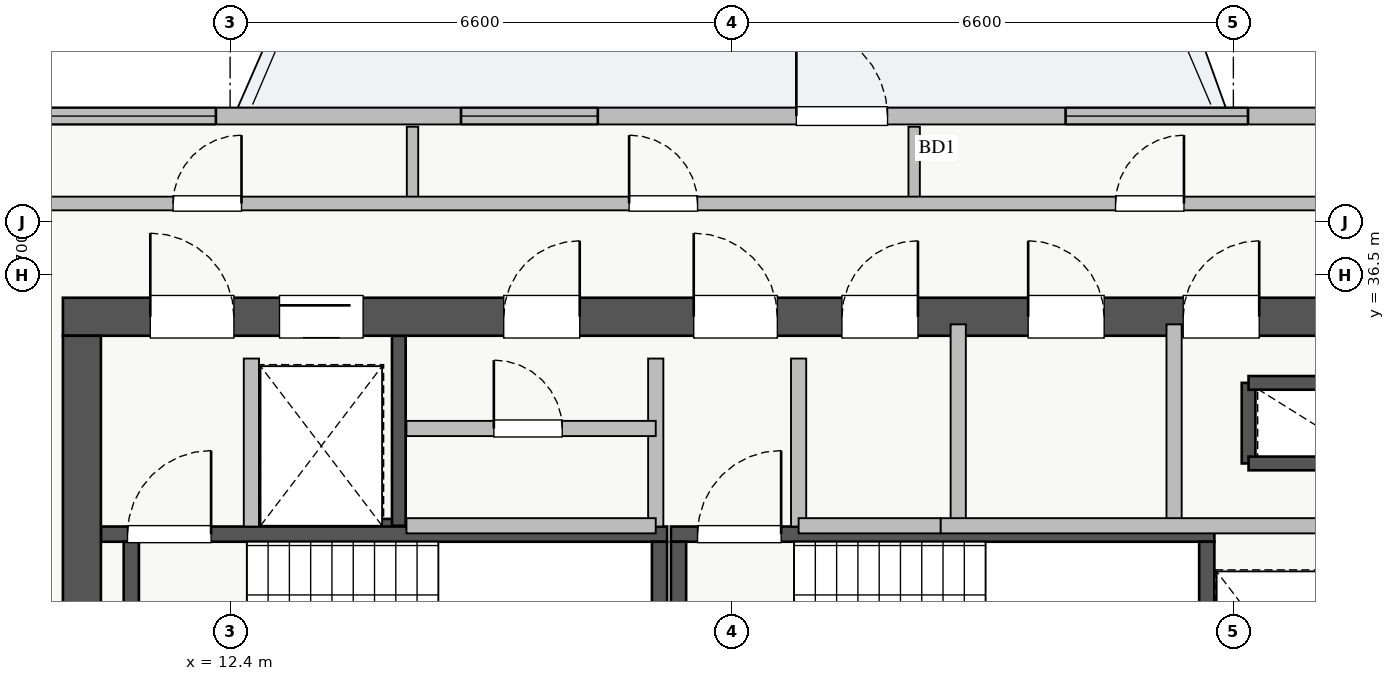
"""IFC4 building model, lengths in metres.
Left out: names, types, materials, properties, quantities, classifications, styles, units other than length and angle.
Written with IfcOpenShell. Run it as: python <this file> out.ifc"""

import sys

from ifc_helpers import new_model, si_unit, direction, frame, frame_2d, origin, place, context, subcontext, project, spatial, rectangle, extrude, source, transform, mapped, element, fill, save


model = new_model("IFC4")
c1 = context("Model", 3, precision=1e-05, world=origin(), true_north=direction((0.0, 1.0)))
c2 = subcontext(c1, "Body", "Model", "MODEL_VIEW")
j1 = project(units=[si_unit("LENGTHUNIT", "METRE"), si_unit("PLANEANGLEUNIT", "RADIAN")], contexts=[c1])
p1 = place(None, origin())
s1 = spatial("IfcSite", under=j1, at=p1, CompositionType="ELEMENT")
p2 = place(p1, origin())
s2 = spatial("IfcBuilding", under=s1, at=p2, CompositionType="ELEMENT")
p3 = place(p2, frame((0.0, 0.0, 260.0)))
s3 = spatial("IfcBuildingStorey", under=s2, at=p3, CompositionType="ELEMENT", Elevation=260.0)
p4 = place(p3, frame((12.68, 33.2, 0.0), z_axis=(0.0, 0.0, 1.0), x_axis=(1.0, 0.0, 0.0)))
e1 = element("IfcWall", 1, at=p4, inside=s3, PredefinedType="SHEAR", context=c2, shape_type="SweptSolid", body=[
    extrude(rectangle(XDim=1.94, YDim=0.18, at=frame_2d((0.97, 0.0))), origin(), (0.0, 0.0, 1.0), 3.03),
])
p5 = place(p3, frame((14.62, 33.2, 0.0), z_axis=(0.0, 0.0, 1.0), x_axis=(0.0, 1.0, 0.0)))
e2 = element("IfcWall", 2, at=p5, inside=s3, PredefinedType="SHEAR", context=c2, shape_type="SweptSolid", body=[
    extrude(rectangle(XDim=2.5, YDim=0.18, at=frame_2d((1.25, 0.0))), origin(), (0.0, 0.0, 1.0), 3.03),
])
p6 = place(p3, frame((25.8, 34.02, 0.0), z_axis=(0.0, 0.0, 1.0), x_axis=(0.0, 1.0, 0.0)))
e3 = element("IfcWall", 3, at=p6, inside=s3, PredefinedType="SHEAR", context=c2, shape_type="SweptSolid", body=[
    extrude(rectangle(XDim=1.06, YDim=0.18, at=frame_2d((0.53, 0.0))), origin(), (0.0, 0.0, 1.0), 3.03),
])
for number, where, z_axis, x_axis in (
    (4, (25.8, 35.08, 0.0), (0.0, 0.0, 1.0), (1.0, 0.0, 0.0)),
    (5, (25.8, 34.02, 0.0), (0.0, 0.0, 1.0), (1.0, 0.0, 0.0)),
):
    element("IfcWall", number, at=place(p3, frame(where, z_axis=z_axis, x_axis=x_axis)), inside=s3, PredefinedType="SHEAR", context=c2, shape_type="SweptSolid", body=[
        extrude(rectangle(XDim=1.5, YDim=0.18, at=frame_2d((0.75, 0.0))), origin(), (0.0, 0.0, 1.0), 3.03),
    ])
p7 = place(p3, frame((10.7, 33.09, 0.0), z_axis=(0.0, 0.0, 1.0), x_axis=(1.0, 0.0, 0.0)))
e6 = element("IfcWall", 6, at=p7, inside=s3, PredefinedType="SHEAR", context=c2, shape_type="SweptSolid", body=[
    extrude(rectangle(XDim=7.45, YDim=0.2, at=frame_2d((3.725, 0.0))), origin(), (0.0, 0.0, 1.0), 3.25),
])
p8 = place(p7, frame((0.35, 0.0, 0.0)))
e7 = element("IfcOpeningElement", 7, at=p8, cuts=e6, PredefinedType="OPENING", context=c2, shape_type="SweptSolid", body=[
    extrude(rectangle(XDim=1.1, YDim=2.05, at=frame_2d((0.55, 1.025))), frame((0.0, 0.11, 0.0), z_axis=(0.0, -1.0, 0.0), x_axis=(1.0, 0.0, 0.0)), (0.0, 0.0, 1.0), 0.22),
])
for number, where, z_axis, x_axis in (
    (8, (11.1, 30.05, 0.0), (0.0, 0.0, 1.0), (0.0, 1.0, 0.0)),
    (9, (18.05, 30.05, 0.0), (0.0, 0.0, 1.0), (0.0, 1.0, 0.0)),
):
    element("IfcWall", number, at=place(p3, frame(where, z_axis=z_axis, x_axis=x_axis)), inside=s3, PredefinedType="SHEAR", context=c2, shape_type="SweptSolid", body=[
        extrude(rectangle(XDim=2.94, YDim=0.2, at=frame_2d((1.47, 0.0))), origin(), (0.0, 0.0, 1.0), 3.25),
    ])
p9 = place(p3, frame((18.2, 33.09, 0.0), z_axis=(0.0, 0.0, 1.0), x_axis=(1.0, 0.0, 0.0)))
e10 = element("IfcWall", 10, at=p9, inside=s3, PredefinedType="SHEAR", context=c2, shape_type="SweptSolid", body=[
    extrude(rectangle(XDim=7.15, YDim=0.2, at=frame_2d((3.575, 0.0))), origin(), (0.0, 0.0, 1.0), 3.25),
])
p10 = place(p9, frame((0.35, 0.0, 0.0)))
e11 = element("IfcOpeningElement", 11, at=p10, cuts=e10, PredefinedType="OPENING", context=c2, shape_type="SweptSolid", body=[
    extrude(rectangle(XDim=1.1, YDim=2.05, at=frame_2d((0.55, 1.025))), frame((0.0, 0.11, 0.0), z_axis=(0.0, -1.0, 0.0), x_axis=(1.0, 0.0, 0.0)), (0.0, 0.0, 1.0), 0.22),
])
for number, where, z_axis, x_axis in (
    (12, (18.3, 30.05, 0.0), (0.0, 0.0, 1.0), (0.0, 1.0, 0.0)),
    (13, (25.25, 30.05, 0.0), (0.0, 0.0, 1.0), (0.0, 1.0, 0.0)),
):
    element("IfcWall", number, at=place(p3, frame(where, z_axis=z_axis, x_axis=x_axis)), inside=s3, PredefinedType="SHEAR", context=c2, shape_type="SweptSolid", body=[
        extrude(rectangle(XDim=2.94, YDim=0.2, at=frame_2d((1.47, 0.0))), origin(), (0.0, 0.0, 1.0), 3.25),
    ])
p11 = place(p3, frame((10.2, 35.95, 0.0), z_axis=(0.0, 0.0, 1.0), x_axis=(1.0, 0.0, 0.0)))
e14 = element("IfcWall", 14, at=p11, inside=s3, PredefinedType="SHEAR", context=c2, shape_type="SweptSolid", body=[
    extrude(rectangle(XDim=17.6, YDim=0.5, at=frame_2d((8.8, 0.0))), origin(), (0.0, 0.0, 1.0), 3.25),
])
p12 = place(p11, frame((1.15, 0.0, 0.0)))
e15 = element("IfcOpeningElement", 15, at=p12, cuts=e14, PredefinedType="OPENING", context=c2, shape_type="SweptSolid", body=[
    extrude(rectangle(XDim=1.1, YDim=2.05, at=frame_2d((0.55, 1.025))), frame((0.0, 0.26, 0.0), z_axis=(0.0, -1.0, 0.0), x_axis=(1.0, 0.0, 0.0)), (0.0, 0.0, 1.0), 0.52),
])
p13 = place(p11, frame((8.3, 0.0, 0.0)))
e16 = element("IfcOpeningElement", 16, at=p13, cuts=e14, PredefinedType="OPENING", context=c2, shape_type="SweptSolid", body=[
    extrude(rectangle(XDim=1.1, YDim=2.05, at=frame_2d((0.55, 1.025))), frame((0.0, 0.26, 0.0), z_axis=(0.0, -1.0, 0.0), x_axis=(1.0, 0.0, 0.0)), (0.0, 0.0, 1.0), 0.52),
])
p14 = place(p11, frame((2.85, 0.0, 0.0)))
e17 = element("IfcOpeningElement", 17, at=p14, cuts=e14, PredefinedType="OPENING", context=c2, shape_type="SweptSolid", body=[
    extrude(rectangle(XDim=1.1, YDim=2.05, at=frame_2d((0.55, 1.025))), frame((0.0, 0.26, 0.0), z_axis=(0.0, -1.0, 0.0), x_axis=(1.0, 0.0, 0.0)), (0.0, 0.0, 1.0), 0.52),
])
p15 = place(p11, frame((5.8, 0.0, 0.0)))
e18 = element("IfcOpeningElement", 18, at=p15, cuts=e14, PredefinedType="OPENING", context=c2, shape_type="SweptSolid", body=[
    extrude(rectangle(XDim=1.0, YDim=2.05, at=frame_2d((0.5, 1.025))), frame((0.0, 0.26, 0.0), z_axis=(0.0, -1.0, 0.0), x_axis=(1.0, 0.0, 0.0)), (0.0, 0.0, 1.0), 0.52),
])
p16 = place(p11, frame((14.74, 0.0, 0.0)))
e19 = element("IfcOpeningElement", 19, at=p16, cuts=e14, PredefinedType="OPENING", context=c2, shape_type="SweptSolid", body=[
    extrude(rectangle(XDim=1.0, YDim=2.05, at=frame_2d((0.5, 1.025))), frame((0.0, 0.26, 0.0), z_axis=(0.0, -1.0, 0.0), x_axis=(1.0, 0.0, 0.0)), (0.0, 0.0, 1.0), 0.52),
])
p17 = place(p11, frame((10.25, 0.0, 0.0)))
e20 = element("IfcOpeningElement", 20, at=p17, cuts=e14, PredefinedType="OPENING", context=c2, shape_type="SweptSolid", body=[
    extrude(rectangle(XDim=1.0, YDim=2.05, at=frame_2d((0.5, 1.025))), frame((0.0, 0.26, 0.0), z_axis=(0.0, -1.0, 0.0), x_axis=(1.0, 0.0, 0.0)), (0.0, 0.0, 1.0), 0.52),
])
p18 = place(p11, frame((12.7, 0.0, 0.0)))
e21 = element("IfcOpeningElement", 21, at=p18, cuts=e14, PredefinedType="OPENING", context=c2, shape_type="SweptSolid", body=[
    extrude(rectangle(XDim=1.0, YDim=2.05, at=frame_2d((0.5, 1.025))), frame((0.0, 0.26, 0.0), z_axis=(0.0, -1.0, 0.0), x_axis=(1.0, 0.0, 0.0)), (0.0, 0.0, 1.0), 0.52),
])
p19 = place(p3, frame((10.45, 29.5, 0.0), z_axis=(0.0, 0.0, 1.0), x_axis=(0.0, 1.0, 0.0)))
e22 = element("IfcWall", 22, at=p19, inside=s3, PredefinedType="SHEAR", context=c2, shape_type="SweptSolid", body=[
    extrude(rectangle(XDim=6.2, YDim=0.5, at=frame_2d((3.1, 0.0))), origin(), (0.0, 0.0, 1.0), 3.25),
])
p20 = place(p3, frame((8.35, 38.59, 0.0), z_axis=(0.0, 0.0, 1.0), x_axis=(1.0, 0.0, 0.0)))
e23 = element("IfcWall", 23, at=p20, inside=s3, PredefinedType="STANDARD", context=c2, shape_type="SweptSolid", body=[
    extrude(rectangle(XDim=21.3, YDim=0.22, at=frame_2d((10.65, 0.0))), origin(), (0.0, 0.0, 1.0), 2.57),
])
p21 = place(p20, frame((11.5, 0.0, 0.0)))
e24 = element("IfcOpeningElement", 24, at=p21, cuts=e23, PredefinedType="OPENING", context=c2, shape_type="SweptSolid", body=[
    extrude(rectangle(XDim=1.2, YDim=2.1, at=frame_2d((0.6, 1.05))), frame((0.0, 0.12, 0.0), z_axis=(0.0, -1.0, 0.0), x_axis=(1.0, 0.0, 0.0)), (0.0, 0.0, 1.0), 0.24),
])
p22 = place(p20, frame((1.463, 0.0, 0.9)))
e25 = element("IfcOpeningElement", 25, at=p22, cuts=e23, PredefinedType="OPENING", context=c2, shape_type="SweptSolid", body=[
    extrude(rectangle(XDim=2.4, YDim=1.48, at=frame_2d((1.2, 0.74))), frame((0.0, 0.12, 0.0), z_axis=(0.0, -1.0, 0.0), x_axis=(1.0, 0.0, 0.0)), (0.0, 0.0, 1.0), 0.24),
])
p23 = place(p20, frame((7.088, 0.0, 0.9)))
e26 = element("IfcOpeningElement", 26, at=p23, cuts=e23, PredefinedType="OPENING", context=c2, shape_type="SweptSolid", body=[
    extrude(rectangle(XDim=1.8, YDim=1.45, at=frame_2d((0.9, 0.725))), frame((0.0, 0.12, 0.0), z_axis=(0.0, -1.0, 0.0), x_axis=(1.0, 0.0, 0.0)), (0.0, 0.0, 1.0), 0.24),
])
p24 = place(p20, frame((19.775, 0.0, 0.9)))
e27 = element("IfcOpeningElement", 27, at=p24, cuts=e23, PredefinedType="OPENING", context=c2, shape_type="SweptSolid", body=[
    extrude(rectangle(XDim=1.2, YDim=1.4, at=frame_2d((0.6, 0.7))), frame((0.0, 0.12, 0.0), z_axis=(0.0, -1.0, 0.0), x_axis=(1.0, 0.0, 0.0)), (0.0, 0.0, 1.0), 0.24),
])
p25 = place(p20, frame((15.042, 0.0, 0.9)))
e28 = element("IfcOpeningElement", 28, at=p25, cuts=e23, PredefinedType="OPENING", context=c2, shape_type="SweptSolid", body=[
    extrude(rectangle(XDim=2.4, YDim=1.5, at=frame_2d((1.2, 0.75))), frame((0.0, 0.12, 0.0), z_axis=(0.0, -1.0, 0.0), x_axis=(1.0, 0.0, 0.0)), (0.0, 0.0, 1.0), 0.24),
])
for number, where, z_axis, x_axis in (
    (29, (12.68, 33.19, 0.0), (0.0, 0.0, 1.0), (0.0, 1.0, 0.0)),
    (30, (18.0, 33.19, 0.0), (0.0, 0.0, 1.0), (0.0, 1.0, 0.0)),
    (31, (19.88, 33.19, 0.0), (0.0, 0.0, 1.0), (0.0, 1.0, 0.0)),
):
    element("IfcWall", number, at=place(p3, frame(where, z_axis=z_axis, x_axis=x_axis)), inside=s3, PredefinedType="PARTITIONING", context=c2, shape_type="SweptSolid", body=[
        extrude(rectangle(XDim=2.21, YDim=0.2, at=frame_2d((1.105, 0.0))), origin(), (0.0, 0.0, 1.0), 3.03),
    ])
p26 = place(p3, frame((14.72, 34.48, 0.0), z_axis=(0.0, 0.0, 1.0), x_axis=(1.0, 0.0, 0.0)))
e32 = element("IfcWall", 32, at=p26, inside=s3, PredefinedType="PARTITIONING", context=c2, shape_type="SweptSolid", body=[
    extrude(rectangle(XDim=3.28, YDim=0.2, at=frame_2d((1.64, 0.0))), origin(), (0.0, 0.0, 1.0), 3.03),
])
p27 = place(p26, frame((1.15, 0.0, 0.0)))
e33 = element("IfcOpeningElement", 33, at=p27, cuts=e32, PredefinedType="OPENING", context=c2, shape_type="SweptSolid", body=[
    extrude(rectangle(XDim=0.9, YDim=2.05, at=frame_2d((0.45, 1.025))), frame((0.0, 0.11, 0.0), z_axis=(0.0, -1.0, 0.0), x_axis=(1.0, 0.0, 0.0)), (0.0, 0.0, 1.0), 0.22),
])
p28 = place(p3, frame((14.72, 33.2, 0.0), z_axis=(0.0, 0.0, 1.0), x_axis=(1.0, 0.0, 0.0)))
e34 = element("IfcWall", 34, at=p28, inside=s3, PredefinedType="PARTITIONING", context=c2, shape_type="SweptSolid", body=[
    extrude(rectangle(XDim=3.28, YDim=0.2, at=frame_2d((1.64, 0.0))), origin(), (0.0, 0.0, 1.0), 3.03),
])
p29 = place(p3, frame((24.82, 33.2, 0.0), z_axis=(0.0, 0.0, 1.0), x_axis=(0.0, 1.0, 0.0)))
e35 = element("IfcWall", 35, at=p29, inside=s3, PredefinedType="PARTITIONING", context=c2, shape_type="SweptSolid", body=[
    extrude(rectangle(XDim=2.65, YDim=0.2, at=frame_2d((1.325, 0.0))), origin(), (0.0, 0.0, 1.0), 3.03),
])
p30 = place(p3, frame((19.88, 33.2, 0.0), z_axis=(0.0, 0.0, 1.0), x_axis=(1.0, 0.0, 0.0)))
e36 = element("IfcWall", 36, at=p30, inside=s3, PredefinedType="PARTITIONING", context=c2, shape_type="SweptSolid", body=[
    extrude(rectangle(XDim=1.87, YDim=0.2, at=frame_2d((0.935, 0.0))), origin(), (0.0, 0.0, 1.0), 3.03),
])
p31 = place(p3, frame((21.98, 33.2, 0.0), z_axis=(0.0, 0.0, 1.0), x_axis=(0.0, 1.0, 0.0)))
e37 = element("IfcWall", 37, at=p31, inside=s3, PredefinedType="PARTITIONING", context=c2, shape_type="SweptSolid", body=[
    extrude(rectangle(XDim=2.65, YDim=0.2, at=frame_2d((1.325, 0.0))), origin(), (0.0, 0.0, 1.0), 3.03),
])
p32 = place(p3, frame((21.75, 33.2, 0.0), z_axis=(0.0, 0.0, 1.0), x_axis=(1.0, 0.0, 0.0)))
e38 = element("IfcWall", 38, at=p32, inside=s3, PredefinedType="PARTITIONING", context=c2, shape_type="SweptSolid", body=[
    extrude(rectangle(XDim=5.17, YDim=0.2, at=frame_2d((2.585, 0.0))), origin(), (0.0, 0.0, 1.0), 3.03),
])
for number, where, z_axis, x_axis in (
    (39, (14.8, 37.44, 0.0), (0.0, 0.0, 1.0), (0.0, 1.0, 0.0)),
    (40, (21.4, 37.44, 0.0), (0.0, 0.0, 1.0), (0.0, 1.0, 0.0)),
):
    element("IfcWall", number, at=place(p3, frame(where, z_axis=z_axis, x_axis=x_axis)), inside=s3, PredefinedType="PARTITIONING", context=c2, shape_type="SweptSolid", body=[
        extrude(rectangle(XDim=1.01, YDim=0.15, at=frame_2d((0.505, 0.0))), origin(), (0.0, 0.0, 1.0), 3.03),
    ])
p33 = place(p3, frame((8.85, 37.44, 0.0), z_axis=(0.0, 0.0, 1.0), x_axis=(1.0, 0.0, 0.0)))
e41 = element("IfcWall", 41, at=p33, inside=s3, PredefinedType="PARTITIONING", context=c2, shape_type="SweptSolid", body=[
    extrude(rectangle(XDim=18.95, YDim=0.18, at=frame_2d((9.475, 0.0))), origin(), (0.0, 0.0, 1.0), 3.03),
])
p34 = place(p33, frame((2.8, 0.0, 0.0)))
e42 = element("IfcOpeningElement", 42, at=p34, cuts=e41, PredefinedType="OPENING", context=c2, shape_type="SweptSolid", body=[
    extrude(rectangle(XDim=0.9, YDim=2.05, at=frame_2d((0.45, 1.025))), frame((0.0, 0.1, 0.0), z_axis=(0.0, -1.0, 0.0), x_axis=(1.0, 0.0, 0.0)), (0.0, 0.0, 1.0), 0.2),
])
p35 = place(p33, frame((8.8, 0.0, 0.0)))
e43 = element("IfcOpeningElement", 43, at=p35, cuts=e41, PredefinedType="OPENING", context=c2, shape_type="SweptSolid", body=[
    extrude(rectangle(XDim=0.9, YDim=2.05, at=frame_2d((0.45, 1.025))), frame((0.0, 0.1, 0.0), z_axis=(0.0, -1.0, 0.0), x_axis=(1.0, 0.0, 0.0)), (0.0, 0.0, 1.0), 0.2),
])
p36 = place(p33, frame((15.2, 0.0, 0.0)))
e44 = element("IfcOpeningElement", 44, at=p36, cuts=e41, PredefinedType="OPENING", context=c2, shape_type="SweptSolid", body=[
    extrude(rectangle(XDim=0.9, YDim=2.05, at=frame_2d((0.45, 1.025))), frame((0.0, 0.1, 0.0), z_axis=(0.0, -1.0, 0.0), x_axis=(1.0, 0.0, 0.0)), (0.0, 0.0, 1.0), 0.2),
])
m1 = source(origin(), c2, "Body", "SweptSolid", [
    extrude(rectangle(XDim=1.2, YDim=2.1, at=frame_2d((0.6, 1.05))), frame((0.0, 0.025, 0.0), z_axis=(0.0, -1.0, 0.0), x_axis=(1.0, 0.0, 0.0)), (0.0, 0.0, 1.0), 0.05),
])
p37 = place(p21, origin())
e45 = element("IfcDoor", 45, at=p37, inside=s3, OperationType="SINGLE_SWING_LEFT", PredefinedType="DOOR", context=c2, shape_type="MappedRepresentation", body=[
    mapped(m1, transform((0.0, 0.0, 0.0), x_axis=(1.0, 0.0, 0.0), y_axis=(0.0, 1.0, 0.0), z_axis=(0.0, 0.0, 1.0), scale=1.0)),
])
fill(e24, e45)
m2 = source(origin(), c2, "Body", "SweptSolid", [
    extrude(rectangle(XDim=2.4, YDim=1.48, at=frame_2d((1.2, 0.74))), frame((0.0, 0.03, 0.0), z_axis=(0.0, -1.0, 0.0), x_axis=(1.0, 0.0, 0.0)), (0.0, 0.0, 1.0), 0.06),
])
p38 = place(p22, origin())
e46 = element("IfcWindow", 46, at=p38, inside=s3, PartitioningType="TRIPLE_PANEL_VERTICAL", PredefinedType="WINDOW", context=c2, shape_type="MappedRepresentation", body=[
    mapped(m2, transform((0.0, 0.0, 0.0), x_axis=(1.0, 0.0, 0.0), y_axis=(0.0, 1.0, 0.0), z_axis=(0.0, 0.0, 1.0), scale=1.0)),
])
fill(e25, e46)
m3 = source(origin(), c2, "Body", "SweptSolid", [
    extrude(rectangle(XDim=1.8, YDim=1.45, at=frame_2d((0.9, 0.725))), frame((0.0, 0.03, 0.0), z_axis=(0.0, -1.0, 0.0), x_axis=(1.0, 0.0, 0.0)), (0.0, 0.0, 1.0), 0.06),
])
p39 = place(p23, origin())
e47 = element("IfcWindow", 47, at=p39, inside=s3, PartitioningType="DOUBLE_PANEL_VERTICAL", PredefinedType="WINDOW", context=c2, shape_type="MappedRepresentation", body=[
    mapped(m3, transform((0.0, 0.0, 0.0), x_axis=(1.0, 0.0, 0.0), y_axis=(0.0, 1.0, 0.0), z_axis=(0.0, 0.0, 1.0), scale=1.0)),
])
fill(e26, e47)
m4 = source(origin(), c2, "Body", "SweptSolid", [
    extrude(rectangle(XDim=1.1, YDim=2.05, at=frame_2d((0.55, 1.025))), frame((0.0, 0.025, 0.0), z_axis=(0.0, -1.0, 0.0), x_axis=(1.0, 0.0, 0.0)), (0.0, 0.0, 1.0), 0.05),
])
p40 = place(p12, origin())
e48 = element("IfcDoor", 48, at=p40, inside=s3, OperationType="SINGLE_SWING_LEFT", PredefinedType="DOOR", context=c2, shape_type="MappedRepresentation", body=[
    mapped(m4, transform((0.0, 0.0, 0.0), x_axis=(1.0, 0.0, 0.0), y_axis=(0.0, 1.0, 0.0), z_axis=(0.0, 0.0, 1.0), scale=1.0)),
])
fill(e15, e48)
p41 = place(p8, origin())
e49 = element("IfcDoor", 49, at=p41, inside=s3, OperationType="SINGLE_SWING_RIGHT", PredefinedType="DOOR", context=c2, shape_type="MappedRepresentation", body=[
    mapped(m4, transform((0.0, 0.0, 0.0), x_axis=(1.0, 0.0, 0.0), y_axis=(0.0, 1.0, 0.0), z_axis=(0.0, 0.0, 1.0), scale=1.0)),
])
fill(e7, e49)
p42 = place(p13, origin())
e50 = element("IfcDoor", 50, at=p42, inside=s3, OperationType="SINGLE_SWING_LEFT", PredefinedType="DOOR", context=c2, shape_type="MappedRepresentation", body=[
    mapped(m4, transform((0.0, 0.0, 0.0), x_axis=(1.0, 0.0, 0.0), y_axis=(0.0, 1.0, 0.0), z_axis=(0.0, 0.0, 1.0), scale=1.0)),
])
fill(e16, e50)
p43 = place(p10, origin())
e51 = element("IfcDoor", 51, at=p43, inside=s3, OperationType="SINGLE_SWING_RIGHT", PredefinedType="DOOR", context=c2, shape_type="MappedRepresentation", body=[
    mapped(m4, transform((0.0, 0.0, 0.0), x_axis=(1.0, 0.0, 0.0), y_axis=(0.0, 1.0, 0.0), z_axis=(0.0, 0.0, 1.0), scale=1.0)),
])
fill(e11, e51)
p44 = place(p14, origin())
e52 = element("IfcDoor", 52, at=p44, inside=s3, OperationType="SLIDING_TO_LEFT", PredefinedType="DOOR", context=c2, shape_type="MappedRepresentation", body=[
    mapped(m4, transform((0.0, 0.0, 0.0), x_axis=(1.0, 0.0, 0.0), y_axis=(0.0, 1.0, 0.0), z_axis=(0.0, 0.0, 1.0), scale=1.0)),
])
fill(e17, e52)
m5 = source(origin(), c2, "Body", "SweptSolid", [
    extrude(rectangle(XDim=1.0, YDim=2.05, at=frame_2d((0.5, 1.025))), frame((0.0, 0.025, 0.0), z_axis=(0.0, -1.0, 0.0), x_axis=(1.0, 0.0, 0.0)), (0.0, 0.0, 1.0), 0.05),
])
p45 = place(p15, origin())
e53 = element("IfcDoor", 53, at=p45, inside=s3, OperationType="SINGLE_SWING_RIGHT", PredefinedType="DOOR", context=c2, shape_type="MappedRepresentation", body=[
    mapped(m5, transform((0.0, 0.0, 0.0), x_axis=(1.0, 0.0, 0.0), y_axis=(0.0, 1.0, 0.0), z_axis=(0.0, 0.0, 1.0), scale=1.0)),
])
fill(e18, e53)
p46 = place(p16, origin())
e54 = element("IfcDoor", 54, at=p46, inside=s3, OperationType="SINGLE_SWING_RIGHT", PredefinedType="DOOR", context=c2, shape_type="MappedRepresentation", body=[
    mapped(m5, transform((0.0, 0.0, 0.0), x_axis=(1.0, 0.0, 0.0), y_axis=(0.0, 1.0, 0.0), z_axis=(0.0, 0.0, 1.0), scale=1.0)),
])
fill(e19, e54)
p47 = place(p17, origin())
e55 = element("IfcDoor", 55, at=p47, inside=s3, OperationType="SINGLE_SWING_RIGHT", PredefinedType="DOOR", context=c2, shape_type="MappedRepresentation", body=[
    mapped(m5, transform((0.0, 0.0, 0.0), x_axis=(1.0, 0.0, 0.0), y_axis=(0.0, 1.0, 0.0), z_axis=(0.0, 0.0, 1.0), scale=1.0)),
])
fill(e20, e55)
p48 = place(p18, origin())
e56 = element("IfcDoor", 56, at=p48, inside=s3, OperationType="SINGLE_SWING_LEFT", PredefinedType="DOOR", context=c2, shape_type="MappedRepresentation", body=[
    mapped(m5, transform((0.0, 0.0, 0.0), x_axis=(1.0, 0.0, 0.0), y_axis=(0.0, 1.0, 0.0), z_axis=(0.0, 0.0, 1.0), scale=1.0)),
])
fill(e21, e56)
m6 = source(origin(), c2, "Body", "SweptSolid", [
    extrude(rectangle(XDim=0.9, YDim=2.05, at=frame_2d((0.45, 1.025))), frame((0.0, 0.025, 0.0), z_axis=(0.0, -1.0, 0.0), x_axis=(1.0, 0.0, 0.0)), (0.0, 0.0, 1.0), 0.05),
])
p49 = place(p27, origin())
e57 = element("IfcDoor", 57, at=p49, inside=s3, OperationType="SINGLE_SWING_LEFT", PredefinedType="DOOR", context=c2, shape_type="MappedRepresentation", body=[
    mapped(m6, transform((0.0, 0.0, 0.0), x_axis=(1.0, 0.0, 0.0), y_axis=(0.0, 1.0, 0.0), z_axis=(0.0, 0.0, 1.0), scale=1.0)),
])
fill(e33, e57)
p50 = place(p34, origin())
e58 = element("IfcDoor", 58, at=p50, inside=s3, OperationType="SINGLE_SWING_RIGHT", PredefinedType="DOOR", context=c2, shape_type="MappedRepresentation", body=[
    mapped(m6, transform((0.0, 0.0, 0.0), x_axis=(1.0, 0.0, 0.0), y_axis=(0.0, 1.0, 0.0), z_axis=(0.0, 0.0, 1.0), scale=1.0)),
])
fill(e42, e58)
p51 = place(p35, origin())
e59 = element("IfcDoor", 59, at=p51, inside=s3, OperationType="SINGLE_SWING_LEFT", PredefinedType="DOOR", context=c2, shape_type="MappedRepresentation", body=[
    mapped(m6, transform((0.0, 0.0, 0.0), x_axis=(1.0, 0.0, 0.0), y_axis=(0.0, 1.0, 0.0), z_axis=(0.0, 0.0, 1.0), scale=1.0)),
])
fill(e43, e59)
p52 = place(p36, origin())
e60 = element("IfcDoor", 60, at=p52, inside=s3, OperationType="SINGLE_SWING_RIGHT", PredefinedType="DOOR", context=c2, shape_type="MappedRepresentation", body=[
    mapped(m6, transform((0.0, 0.0, 0.0), x_axis=(1.0, 0.0, 0.0), y_axis=(0.0, 1.0, 0.0), z_axis=(0.0, 0.0, 1.0), scale=1.0)),
])
fill(e44, e60)
m7 = source(origin(), c2, "Body", "SweptSolid", [
    extrude(rectangle(XDim=2.4, YDim=1.5, at=frame_2d((1.2, 0.75))), frame((0.0, 0.03, 0.0), z_axis=(0.0, -1.0, 0.0), x_axis=(1.0, 0.0, 0.0)), (0.0, 0.0, 1.0), 0.06),
])
p53 = place(p25, origin())
e61 = element("IfcWindow", 61, at=p53, inside=s3, PartitioningType="TRIPLE_PANEL_VERTICAL", PredefinedType="WINDOW", context=c2, shape_type="MappedRepresentation", body=[
    mapped(m7, transform((0.0, 0.0, 0.0), x_axis=(1.0, 0.0, 0.0), y_axis=(0.0, 1.0, 0.0), z_axis=(0.0, 0.0, 1.0), scale=1.0)),
])
fill(e28, e61)
save(model, sys.argv[1])
